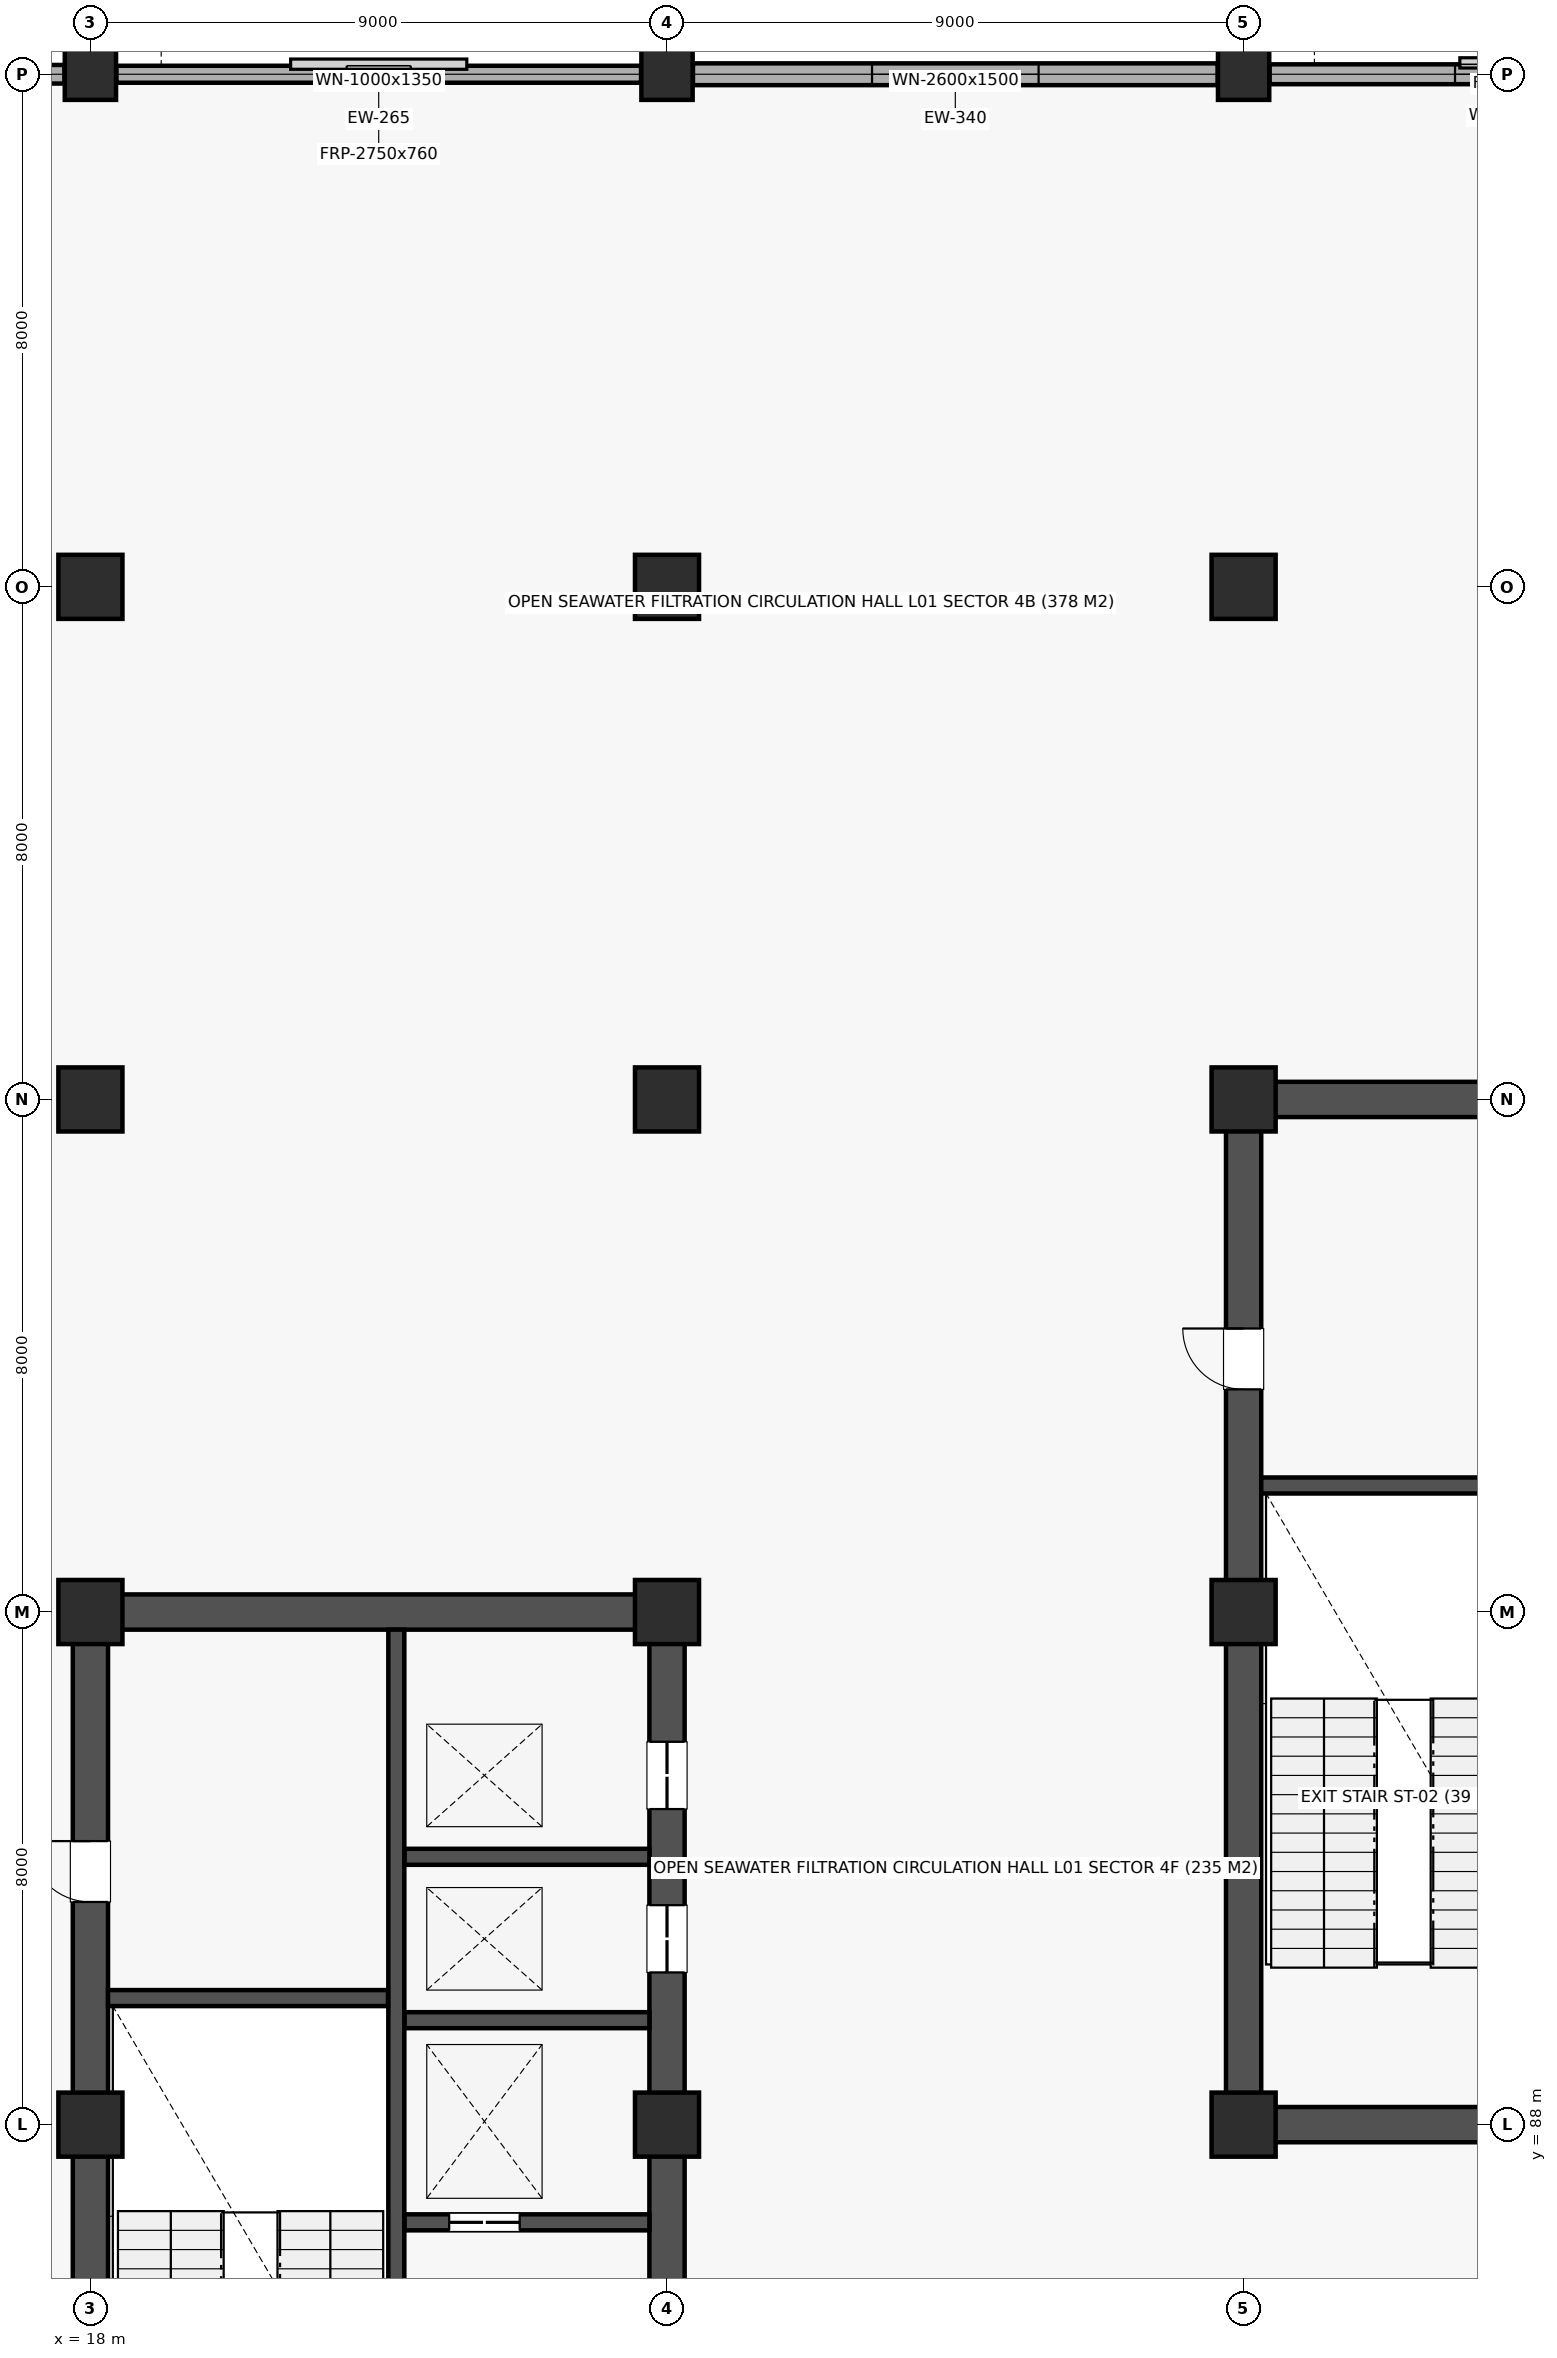
"""IFC4 building model, lengths in metres.
Left out: names, types, materials, properties, quantities, classifications, styles, units other than length and angle.
Written with IfcOpenShell. Run it as: python <this file> out.ifc"""

import sys

from ifc_helpers import new_model, si_unit, direction, frame, frame_2d, origin, origin_2d, place, context, subcontext, project, spatial, rectangle, extrude, element, fill, save


model = new_model("IFC4")
c1 = context("Model", 3, precision=1e-05, world=origin(), true_north=direction((0.0, 1.0)))
c2 = subcontext(c1, "Body", "Model", "MODEL_VIEW")
j1 = project(units=[si_unit("LENGTHUNIT", "METRE"), si_unit("PLANEANGLEUNIT", "RADIAN")], contexts=[c1])
p1 = place(None, origin())
s1 = spatial("IfcSite", under=j1, at=p1, CompositionType="ELEMENT")
p2 = place(p1, origin())
s2 = spatial("IfcBuilding", under=s1, at=p2, CompositionType="ELEMENT")
p3 = place(p2, frame((0.0, 0.0, 4.5)))
s3 = spatial("IfcBuildingStorey", under=s2, at=p3, CompositionType="ELEMENT", Elevation=4.5)
for number, where, z_axis, x_axis in (
    (1, (18.0, 88.0, 0.0), (0.0, 0.0, 1.0), (1.0, 0.0, 0.0)),
    (2, (18.0, 96.0, 0.0), (0.0, 0.0, 1.0), (1.0, 0.0, 0.0)),
    (3, (18.0, 104.0, 0.0), (0.0, 0.0, 1.0), (1.0, 0.0, 0.0)),
    (4, (18.0, 112.0, 0.0), (0.0, 0.0, 1.0), (1.0, 0.0, 0.0)),
):
    element("IfcColumn", number, at=place(p3, frame(where, z_axis=z_axis, x_axis=x_axis)), inside=s3, PredefinedType="COLUMN", context=c2, shape_type="SweptSolid", body=[
        extrude(rectangle(XDim=1.0, YDim=1.0, at=origin_2d()), origin(), (0.0, 0.0, 1.0), 4.5),
    ])
p4 = place(p3, frame((18.0, 120.0, 0.0), z_axis=(0.0, 0.0, 1.0), x_axis=(1.0, 0.0, 0.0)))
e5 = element("IfcColumn", 5, at=p4, inside=s3, PredefinedType="COLUMN", context=c2, shape_type="SweptSolid", body=[
    extrude(rectangle(XDim=0.8, YDim=0.8, at=origin_2d()), origin(), (0.0, 0.0, 1.0), 4.5),
])
for number, where, z_axis, x_axis in (
    (6, (27.0, 88.0, 0.0), (0.0, 0.0, 1.0), (1.0, 0.0, 0.0)),
    (7, (27.0, 96.0, 0.0), (0.0, 0.0, 1.0), (1.0, 0.0, 0.0)),
    (8, (27.0, 104.0, 0.0), (0.0, 0.0, 1.0), (1.0, 0.0, 0.0)),
    (9, (27.0, 112.0, 0.0), (0.0, 0.0, 1.0), (1.0, 0.0, 0.0)),
):
    element("IfcColumn", number, at=place(p3, frame(where, z_axis=z_axis, x_axis=x_axis)), inside=s3, PredefinedType="COLUMN", context=c2, shape_type="SweptSolid", body=[
        extrude(rectangle(XDim=1.0, YDim=1.0, at=origin_2d()), origin(), (0.0, 0.0, 1.0), 4.5),
    ])
p5 = place(p3, frame((27.0, 120.0, 0.0), z_axis=(0.0, 0.0, 1.0), x_axis=(1.0, 0.0, 0.0)))
e10 = element("IfcColumn", 10, at=p5, inside=s3, PredefinedType="COLUMN", context=c2, shape_type="SweptSolid", body=[
    extrude(rectangle(XDim=0.8, YDim=0.8, at=origin_2d()), origin(), (0.0, 0.0, 1.0), 4.5),
])
for number, where, z_axis, x_axis in (
    (11, (36.0, 88.0, 0.0), (0.0, 0.0, 1.0), (1.0, 0.0, 0.0)),
    (12, (36.0, 96.0, 0.0), (0.0, 0.0, 1.0), (1.0, 0.0, 0.0)),
    (13, (36.0, 104.0, 0.0), (0.0, 0.0, 1.0), (1.0, 0.0, 0.0)),
    (14, (36.0, 112.0, 0.0), (0.0, 0.0, 1.0), (1.0, 0.0, 0.0)),
):
    element("IfcColumn", number, at=place(p3, frame(where, z_axis=z_axis, x_axis=x_axis)), inside=s3, PredefinedType="COLUMN", context=c2, shape_type="SweptSolid", body=[
        extrude(rectangle(XDim=1.0, YDim=1.0, at=origin_2d()), origin(), (0.0, 0.0, 1.0), 4.5),
    ])
p6 = place(p3, frame((36.0, 120.0, 0.0), z_axis=(0.0, 0.0, 1.0), x_axis=(1.0, 0.0, 0.0)))
e15 = element("IfcColumn", 15, at=p6, inside=s3, PredefinedType="COLUMN", context=c2, shape_type="SweptSolid", body=[
    extrude(rectangle(XDim=0.8, YDim=0.8, at=origin_2d()), origin(), (0.0, 0.0, 1.0), 4.5),
])
p7 = place(p3, frame((18.275, 96.0, 0.0), z_axis=(0.0, 0.0, 1.0), x_axis=(1.0, 0.0, 0.0)))
e16 = element("IfcWall", 16, at=p7, inside=s3, PredefinedType="SHEAR", context=c2, shape_type="SweptSolid", body=[
    extrude(rectangle(XDim=8.45, YDim=0.55, at=frame_2d((4.225, 0.0))), origin(), (0.0, 0.0, 1.0), 4.18),
])
p8 = place(p3, frame((18.0, 80.275, 0.0), z_axis=(0.0, 0.0, 1.0), x_axis=(0.0, 1.0, 0.0)))
e17 = element("IfcWall", 17, at=p8, inside=s3, PredefinedType="SHEAR", context=c2, shape_type="SweptSolid", body=[
    extrude(rectangle(XDim=15.45, YDim=0.55, at=frame_2d((7.725, 0.0))), origin(), (0.0, 0.0, 1.0), 4.18),
])
p9 = place(p8, frame((11.2, 0.0, 0.0)))
e18 = element("IfcOpeningElement", 18, at=p9, cuts=e17, PredefinedType="OPENING", context=c2, shape_type="SweptSolid", body=[
    extrude(rectangle(XDim=0.95, YDim=2.1, at=frame_2d((0.475, 1.05))), frame((0.0, 0.287, 0.0), z_axis=(0.0, -1.0, 0.0), x_axis=(1.0, 0.0, 0.0)), (0.0, 0.0, 1.0), 0.574),
])
p10 = place(p3, frame((27.0, 80.275, 0.0), z_axis=(0.0, 0.0, 1.0), x_axis=(0.0, 1.0, 0.0)))
e19 = element("IfcWall", 19, at=p10, inside=s3, PredefinedType="SHEAR", context=c2, shape_type="SweptSolid", body=[
    extrude(rectangle(XDim=15.45, YDim=0.55, at=frame_2d((7.725, 0.0))), origin(), (0.0, 0.0, 1.0), 4.18),
])
p11 = place(p10, frame((10.1, 0.0, 0.0)))
e20 = element("IfcOpeningElement", 20, at=p11, cuts=e19, PredefinedType="OPENING", context=c2, shape_type="SweptSolid", body=[
    extrude(rectangle(XDim=1.05, YDim=2.12, at=frame_2d((0.525, 1.06))), frame((0.0, 0.287, 0.0), z_axis=(0.0, -1.0, 0.0), x_axis=(1.0, 0.0, 0.0)), (0.0, 0.0, 1.0), 0.574),
])
p12 = place(p10, frame((12.65, 0.0, 0.0)))
e21 = element("IfcOpeningElement", 21, at=p12, cuts=e19, PredefinedType="OPENING", context=c2, shape_type="SweptSolid", body=[
    extrude(rectangle(XDim=1.05, YDim=2.12, at=frame_2d((0.525, 1.06))), frame((0.0, 0.287, 0.0), z_axis=(0.0, -1.0, 0.0), x_axis=(1.0, 0.0, 0.0)), (0.0, 0.0, 1.0), 0.574),
])
p13 = place(p3, frame((22.775, 80.275, 0.0), z_axis=(0.0, 0.0, 1.0), x_axis=(0.0, 1.0, 0.0)))
e22 = element("IfcWall", 22, at=p13, inside=s3, PredefinedType="SOLIDWALL", context=c2, shape_type="SweptSolid", body=[
    extrude(rectangle(XDim=15.45, YDim=0.25, at=frame_2d((7.725, 0.0))), origin(), (0.0, 0.0, 1.0), 4.18),
])
p14 = place(p13, frame((0.45, 0.0, 0.0)))
e23 = element("IfcOpeningElement", 23, at=p14, cuts=e22, PredefinedType="OPENING", context=c2, shape_type="SweptSolid", body=[
    extrude(rectangle(XDim=1.1, YDim=2.15, at=frame_2d((0.55, 1.075))), frame((0.0, 0.137, 0.0), z_axis=(0.0, -1.0, 0.0), x_axis=(1.0, 0.0, 0.0)), (0.0, 0.0, 1.0), 0.274),
])
p15 = place(p3, frame((18.275, 89.975, 0.0), z_axis=(0.0, 0.0, 1.0), x_axis=(1.0, 0.0, 0.0)))
e24 = element("IfcWall", 24, at=p15, inside=s3, PredefinedType="SOLIDWALL", context=c2, shape_type="SweptSolid", body=[
    extrude(rectangle(XDim=4.37, YDim=0.25, at=frame_2d((2.185, 0.0))), origin(), (0.0, 0.0, 1.0), 4.18),
])
p16 = place(p3, frame((22.905, 86.475, 0.0), z_axis=(0.0, 0.0, 1.0), x_axis=(1.0, 0.0, 0.0)))
e25 = element("IfcWall", 25, at=p16, inside=s3, PredefinedType="SOLIDWALL", context=c2, shape_type="SweptSolid", body=[
    extrude(rectangle(XDim=3.82, YDim=0.25, at=frame_2d((1.91, 0.0))), origin(), (0.0, 0.0, 1.0), 4.18),
])
p17 = place(p16, frame((0.695, 0.0, 0.0)))
e26 = element("IfcOpeningElement", 26, at=p17, cuts=e25, PredefinedType="OPENING", context=c2, shape_type="SweptSolid", body=[
    extrude(rectangle(XDim=1.1, YDim=2.12, at=frame_2d((0.55, 1.06))), frame((0.0, 0.137, 0.0), z_axis=(0.0, -1.0, 0.0), x_axis=(1.0, 0.0, 0.0)), (0.0, 0.0, 1.0), 0.274),
])
for number, where, z_axis, x_axis in (
    (27, (22.905, 89.63, 0.0), (0.0, 0.0, 1.0), (1.0, 0.0, 0.0)),
    (28, (22.905, 92.18, 0.0), (0.0, 0.0, 1.0), (1.0, 0.0, 0.0)),
):
    element("IfcWall", number, at=place(p3, frame(where, z_axis=z_axis, x_axis=x_axis)), inside=s3, PredefinedType="SOLIDWALL", context=c2, shape_type="SweptSolid", body=[
        extrude(rectangle(XDim=3.82, YDim=0.25, at=frame_2d((1.91, 0.0))), origin(), (0.0, 0.0, 1.0), 4.18),
    ])
p18 = place(p3, frame((36.275, 88.0, 0.0), z_axis=(0.0, 0.0, 1.0), x_axis=(1.0, 0.0, 0.0)))
e29 = element("IfcWall", 29, at=p18, inside=s3, PredefinedType="SHEAR", context=c2, shape_type="SweptSolid", body=[
    extrude(rectangle(XDim=8.45, YDim=0.55, at=frame_2d((4.225, 0.0))), origin(), (0.0, 0.0, 1.0), 4.18),
])
p19 = place(p18, frame((5.5, 0.0, 0.0)))
e30 = element("IfcOpeningElement", 30, at=p19, cuts=e29, PredefinedType="OPENING", context=c2, shape_type="SweptSolid", body=[
    extrude(rectangle(XDim=1.8, YDim=2.18, at=frame_2d((0.9, 1.09))), frame((0.0, 0.287, 0.0), z_axis=(0.0, -1.0, 0.0), x_axis=(1.0, 0.0, 0.0)), (0.0, 0.0, 1.0), 0.574),
])
p20 = place(p3, frame((36.275, 104.0, 0.0), z_axis=(0.0, 0.0, 1.0), x_axis=(1.0, 0.0, 0.0)))
e31 = element("IfcWall", 31, at=p20, inside=s3, PredefinedType="SHEAR", context=c2, shape_type="SweptSolid", body=[
    extrude(rectangle(XDim=8.45, YDim=0.55, at=frame_2d((4.225, 0.0))), origin(), (0.0, 0.0, 1.0), 4.18),
])
p21 = place(p3, frame((36.0, 88.275, 0.0), z_axis=(0.0, 0.0, 1.0), x_axis=(0.0, 1.0, 0.0)))
e32 = element("IfcWall", 32, at=p21, inside=s3, PredefinedType="SHEAR", context=c2, shape_type="SweptSolid", body=[
    extrude(rectangle(XDim=15.45, YDim=0.55, at=frame_2d((7.725, 0.0))), origin(), (0.0, 0.0, 1.0), 4.18),
])
p22 = place(p21, frame((11.2, 0.0, 0.0)))
e33 = element("IfcOpeningElement", 33, at=p22, cuts=e32, PredefinedType="OPENING", context=c2, shape_type="SweptSolid", body=[
    extrude(rectangle(XDim=0.95, YDim=2.1, at=frame_2d((0.475, 1.05))), frame((0.0, 0.287, 0.0), z_axis=(0.0, -1.0, 0.0), x_axis=(1.0, 0.0, 0.0)), (0.0, 0.0, 1.0), 0.574),
])
p23 = place(p3, frame((36.275, 97.975, 0.0), z_axis=(0.0, 0.0, 1.0), x_axis=(1.0, 0.0, 0.0)))
e34 = element("IfcWall", 34, at=p23, inside=s3, PredefinedType="SOLIDWALL", context=c2, shape_type="SweptSolid", body=[
    extrude(rectangle(XDim=4.37, YDim=0.25, at=frame_2d((2.185, 0.0))), origin(), (0.0, 0.0, 1.0), 4.18),
])
p24 = place(p3, frame((9.405, 120.0, 0.0), z_axis=(0.0, 0.0, 1.0), x_axis=(1.0, 0.0, 0.0)))
e35 = element("IfcWall", 35, at=p24, inside=s3, PredefinedType="STANDARD", context=c2, shape_type="SweptSolid", body=[
    extrude(rectangle(XDim=8.19, YDim=0.29, at=frame_2d((4.095, 0.0))), origin(), (0.0, 0.0, 1.0), 3.46),
])
p25 = place(p24, frame((3.495, 0.0, 0.85)))
e36 = element("IfcOpeningElement", 36, at=p25, cuts=e35, PredefinedType="OPENING", context=c2, shape_type="SweptSolid", body=[
    extrude(rectangle(XDim=1.2, YDim=1.35, at=frame_2d((0.6, 0.675))), frame((0.0, 0.157, 0.0), z_axis=(0.0, -1.0, 0.0), x_axis=(1.0, 0.0, 0.0)), (0.0, 0.0, 1.0), 0.314),
])
p26 = place(p3, frame((18.405, 120.0, 0.0), z_axis=(0.0, 0.0, 1.0), x_axis=(1.0, 0.0, 0.0)))
e37 = element("IfcWall", 37, at=p26, inside=s3, PredefinedType="STANDARD", context=c2, shape_type="SweptSolid", body=[
    extrude(rectangle(XDim=8.19, YDim=0.265, at=frame_2d((4.095, 0.0))), origin(), (0.0, 0.0, 1.0), 3.46),
])
p27 = place(p26, frame((3.595, 0.0, 0.85)))
e38 = element("IfcOpeningElement", 38, at=p27, cuts=e37, PredefinedType="OPENING", context=c2, shape_type="SweptSolid", body=[
    extrude(rectangle(XDim=1.0, YDim=1.35, at=frame_2d((0.5, 0.675))), frame((0.0, 0.145, 0.0), z_axis=(0.0, -1.0, 0.0), x_axis=(1.0, 0.0, 0.0)), (0.0, 0.0, 1.0), 0.289),
])
p28 = place(p3, frame((27.405, 120.0, 0.0), z_axis=(0.0, 0.0, 1.0), x_axis=(1.0, 0.0, 0.0)))
e39 = element("IfcWall", 39, at=p28, inside=s3, PredefinedType="STANDARD", context=c2, shape_type="SweptSolid", body=[
    extrude(rectangle(XDim=8.19, YDim=0.34, at=frame_2d((4.095, 0.0))), origin(), (0.0, 0.0, 1.0), 3.46),
])
p29 = place(p28, frame((2.795, 0.0, 0.85)))
e40 = element("IfcOpeningElement", 40, at=p29, cuts=e39, PredefinedType="OPENING", context=c2, shape_type="SweptSolid", body=[
    extrude(rectangle(XDim=2.6, YDim=1.5, at=frame_2d((1.3, 0.75))), frame((0.0, 0.182, 0.0), z_axis=(0.0, -1.0, 0.0), x_axis=(1.0, 0.0, 0.0)), (0.0, 0.0, 1.0), 0.364),
])
p30 = place(p3, frame((36.405, 120.0, 0.0), z_axis=(0.0, 0.0, 1.0), x_axis=(1.0, 0.0, 0.0)))
e41 = element("IfcWall", 41, at=p30, inside=s3, PredefinedType="STANDARD", context=c2, shape_type="SweptSolid", body=[
    extrude(rectangle(XDim=8.19, YDim=0.31, at=frame_2d((4.095, 0.0))), origin(), (0.0, 0.0, 1.0), 3.46),
])
p31 = place(p30, frame((2.895, 0.0, 0.85)))
e42 = element("IfcOpeningElement", 42, at=p31, cuts=e41, PredefinedType="OPENING", context=c2, shape_type="SweptSolid", body=[
    extrude(rectangle(XDim=2.4, YDim=1.5, at=frame_2d((1.2, 0.75))), frame((0.0, 0.167, 0.0), z_axis=(0.0, -1.0, 0.0), x_axis=(1.0, 0.0, 0.0)), (0.0, 0.0, 1.0), 0.334),
])
p32 = place(p9, origin())
e43 = element("IfcDoor", 43, at=p32, inside=s3, OperationType="SINGLE_SWING_RIGHT", PredefinedType="DOOR", context=c2, shape_type="SweptSolid", body=[
    extrude(rectangle(XDim=0.95, YDim=2.1, at=frame_2d((0.475, 1.05))), frame((0.0, 0.025, 0.0), z_axis=(0.0, -1.0, 0.0), x_axis=(1.0, 0.0, 0.0)), (0.0, 0.0, 1.0), 0.05),
])
fill(e18, e43)
p33 = place(p17, origin())
e44 = element("IfcDoor", 44, at=p33, inside=s3, OperationType="DOUBLE_DOOR_SLIDING", PredefinedType="DOOR", context=c2, shape_type="SweptSolid", body=[
    extrude(rectangle(XDim=1.1, YDim=2.12, at=frame_2d((0.55, 1.06))), frame((0.0, 0.025, 0.0), z_axis=(0.0, -1.0, 0.0), x_axis=(1.0, 0.0, 0.0)), (0.0, 0.0, 1.0), 0.05),
])
fill(e26, e44)
p34 = place(p11, origin())
e45 = element("IfcDoor", 45, at=p34, inside=s3, OperationType="DOUBLE_DOOR_SLIDING", PredefinedType="DOOR", context=c2, shape_type="SweptSolid", body=[
    extrude(rectangle(XDim=1.05, YDim=2.12, at=frame_2d((0.525, 1.06))), frame((0.0, 0.025, 0.0), z_axis=(0.0, -1.0, 0.0), x_axis=(1.0, 0.0, 0.0)), (0.0, 0.0, 1.0), 0.05),
])
fill(e20, e45)
p35 = place(p12, origin())
e46 = element("IfcDoor", 46, at=p35, inside=s3, OperationType="DOUBLE_DOOR_SLIDING", PredefinedType="DOOR", context=c2, shape_type="SweptSolid", body=[
    extrude(rectangle(XDim=1.05, YDim=2.12, at=frame_2d((0.525, 1.06))), frame((0.0, 0.025, 0.0), z_axis=(0.0, -1.0, 0.0), x_axis=(1.0, 0.0, 0.0)), (0.0, 0.0, 1.0), 0.05),
])
fill(e21, e46)
p36 = place(p22, origin())
e47 = element("IfcDoor", 47, at=p36, inside=s3, OperationType="SINGLE_SWING_RIGHT", PredefinedType="DOOR", context=c2, shape_type="SweptSolid", body=[
    extrude(rectangle(XDim=0.95, YDim=2.1, at=frame_2d((0.475, 1.05))), frame((0.0, 0.025, 0.0), z_axis=(0.0, -1.0, 0.0), x_axis=(1.0, 0.0, 0.0)), (0.0, 0.0, 1.0), 0.05),
])
fill(e33, e47)
p37 = place(p27, origin())
e48 = element("IfcWindow", 48, at=p37, inside=s3, PartitioningType="SINGLE_PANEL", PredefinedType="WINDOW", context=c2, shape_type="SweptSolid", body=[
    extrude(rectangle(XDim=1.0, YDim=1.35, at=frame_2d((0.5, 0.675))), frame((0.0, 0.03, 0.0), z_axis=(0.0, -1.0, 0.0), x_axis=(1.0, 0.0, 0.0)), (0.0, 0.0, 1.0), 0.06),
])
fill(e38, e48)
p38 = place(p29, origin())
e49 = element("IfcWindow", 49, at=p38, inside=s3, PartitioningType="SINGLE_PANEL", PredefinedType="WINDOW", context=c2, shape_type="SweptSolid", body=[
    extrude(rectangle(XDim=2.6, YDim=1.5, at=frame_2d((1.3, 0.75))), frame((0.0, 0.03, 0.0), z_axis=(0.0, -1.0, 0.0), x_axis=(1.0, 0.0, 0.0)), (0.0, 0.0, 1.0), 0.06),
])
fill(e40, e49)
p39 = place(p31, origin())
e50 = element("IfcWindow", 50, at=p39, inside=s3, PartitioningType="SINGLE_PANEL", PredefinedType="WINDOW", context=c2, shape_type="SweptSolid", body=[
    extrude(rectangle(XDim=2.4, YDim=1.5, at=frame_2d((1.2, 0.75))), frame((0.0, 0.03, 0.0), z_axis=(0.0, -1.0, 0.0), x_axis=(1.0, 0.0, 0.0)), (0.0, 0.0, 1.0), 0.06),
])
fill(e42, e50)
save(model, sys.argv[1])
